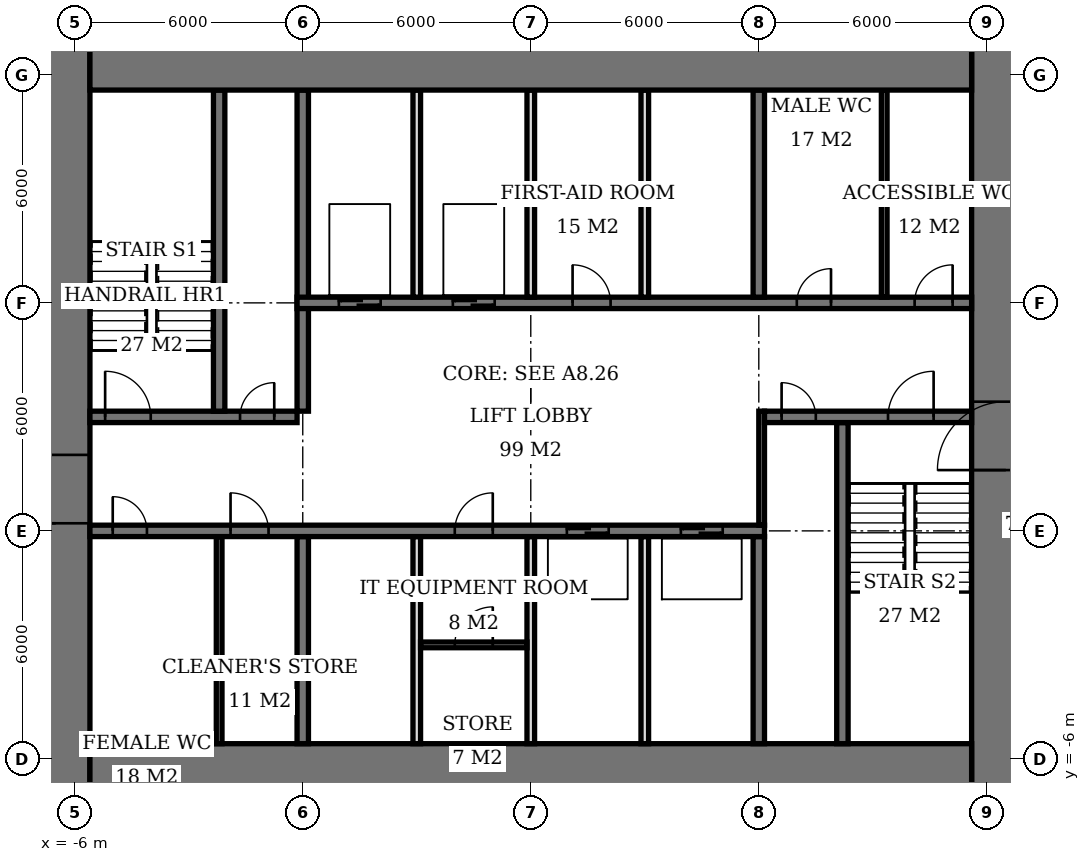
"""IFC4 building model, lengths in metres.
Left out: names, types, materials, properties, quantities, classifications, styles, units other than length and angle.
Written with IfcOpenShell. Run it as: python <this file> out.ifc"""

import sys

from ifc_helpers import new_model, si_unit, direction, frame, frame_2d, origin, place, context, subcontext, project, spatial, rectangle, extrude, element, fill, save


model = new_model("IFC4")
c1 = context("Model", 3, precision=1e-05, world=origin(), true_north=direction((0.0, 1.0)))
c2 = subcontext(c1, "Body", "Model", "MODEL_VIEW")
j1 = project(units=[si_unit("LENGTHUNIT", "METRE"), si_unit("PLANEANGLEUNIT", "RADIAN")], contexts=[c1])
p1 = place(None, origin())
s1 = spatial("IfcSite", under=j1, at=p1, CompositionType="ELEMENT")
p2 = place(p1, origin())
s2 = spatial("IfcBuilding", under=s1, at=p2, CompositionType="ELEMENT")
p3 = place(p2, frame((0.0, 0.0, 196.7)))
s3 = spatial("IfcBuildingStorey", under=s2, at=p3, CompositionType="ELEMENT", Elevation=196.7)
for number, where, z_axis, x_axis in (
    (1, (-5.6, -6.6, 0.0), (0.0, 0.0, 1.0), (1.0, 0.0, 0.0)),
    (2, (-5.6, 12.6, 0.0), (0.0, 0.0, 1.0), (1.0, 0.0, 0.0)),
):
    element("IfcWall", number, at=place(p3, frame(where, z_axis=z_axis, x_axis=x_axis)), inside=s3, PredefinedType="SHEAR", context=c2, shape_type="SweptSolid", body=[
        extrude(rectangle(XDim=23.2, YDim=2.0, at=frame_2d((11.6, 0.0))), origin(), (0.0, 0.0, 1.0), 3.9),
    ])
p4 = place(p3, frame((-6.5, -7.6, 0.0), z_axis=(0.0, 0.0, 1.0), x_axis=(0.0, 1.0, 0.0)))
e3 = element("IfcWall", 3, at=p4, inside=s3, PredefinedType="SHEAR", context=c2, shape_type="SweptSolid", body=[
    extrude(rectangle(XDim=21.2, YDim=1.8, at=frame_2d((10.6, 0.0))), origin(), (0.0, 0.0, 1.0), 3.9),
])
p5 = place(p4, frame((7.8, 0.0, 0.0)))
e4 = element("IfcOpeningElement", 4, at=p5, cuts=e3, PredefinedType="OPENING", context=c2, shape_type="SweptSolid", body=[
    extrude(rectangle(XDim=1.8, YDim=2.4, at=frame_2d((0.9, 1.2))), frame((0.0, 0.91, 0.0), z_axis=(0.0, -1.0, 0.0), x_axis=(1.0, 0.0, 0.0)), (0.0, 0.0, 1.0), 1.82),
])
p6 = place(p3, frame((18.5, -7.6, 0.0), z_axis=(0.0, 0.0, 1.0), x_axis=(0.0, 1.0, 0.0)))
e5 = element("IfcWall", 5, at=p6, inside=s3, PredefinedType="SHEAR", context=c2, shape_type="SweptSolid", body=[
    extrude(rectangle(XDim=21.2, YDim=1.8, at=frame_2d((10.6, 0.0))), origin(), (0.0, 0.0, 1.0), 3.9),
])
p7 = place(p6, frame((9.2, 0.0, 0.0)))
e6 = element("IfcOpeningElement", 6, at=p7, cuts=e5, PredefinedType="OPENING", context=c2, shape_type="SweptSolid", body=[
    extrude(rectangle(XDim=1.8, YDim=2.4, at=frame_2d((0.9, 1.2))), frame((0.0, 0.91, 0.0), z_axis=(0.0, -1.0, 0.0), x_axis=(1.0, 0.0, 0.0)), (0.0, 0.0, 1.0), 1.82),
])
p8 = place(p3, frame((-5.6, 0.0, 0.0), z_axis=(0.0, 0.0, 1.0), x_axis=(1.0, 0.0, 0.0)))
e7 = element("IfcWall", 7, at=p8, inside=s3, PredefinedType="SHEAR", context=c2, shape_type="SweptSolid", body=[
    extrude(rectangle(XDim=17.75, YDim=0.3, at=frame_2d((8.875, 0.0))), origin(), (0.0, 0.0, 1.0), 3.9),
])
p9 = place(p8, frame((0.6, 0.0, 0.0)))
e8 = element("IfcOpeningElement", 8, at=p9, cuts=e7, PredefinedType="OPENING", context=c2, shape_type="SweptSolid", body=[
    extrude(rectangle(XDim=0.9, YDim=2.1, at=frame_2d((0.45, 1.05))), frame((0.0, 0.16, 0.0), z_axis=(0.0, -1.0, 0.0), x_axis=(1.0, 0.0, 0.0)), (0.0, 0.0, 1.0), 0.32),
])
p10 = place(p8, frame((3.7, 0.0, 0.0)))
e9 = element("IfcOpeningElement", 9, at=p10, cuts=e7, PredefinedType="OPENING", context=c2, shape_type="SweptSolid", body=[
    extrude(rectangle(XDim=1.0, YDim=2.1, at=frame_2d((0.5, 1.05))), frame((0.0, 0.16, 0.0), z_axis=(0.0, -1.0, 0.0), x_axis=(1.0, 0.0, 0.0)), (0.0, 0.0, 1.0), 0.32),
])
p11 = place(p8, frame((9.6, 0.0, 0.0)))
e10 = element("IfcOpeningElement", 10, at=p11, cuts=e7, PredefinedType="OPENING", context=c2, shape_type="SweptSolid", body=[
    extrude(rectangle(XDim=1.0, YDim=2.1, at=frame_2d((0.5, 1.05))), frame((0.0, 0.16, 0.0), z_axis=(0.0, -1.0, 0.0), x_axis=(1.0, 0.0, 0.0)), (0.0, 0.0, 1.0), 0.32),
])
p12 = place(p8, frame((12.55, 0.0, 0.0)))
e11 = element("IfcOpeningElement", 11, at=p12, cuts=e7, PredefinedType="OPENING", context=c2, shape_type="SweptSolid", body=[
    extrude(rectangle(XDim=1.1, YDim=2.1, at=frame_2d((0.55, 1.05))), frame((0.0, 0.16, 0.0), z_axis=(0.0, -1.0, 0.0), x_axis=(1.0, 0.0, 0.0)), (0.0, 0.0, 1.0), 0.32),
])
p13 = place(p8, frame((15.55, 0.0, 0.0)))
e12 = element("IfcOpeningElement", 12, at=p13, cuts=e7, PredefinedType="OPENING", context=c2, shape_type="SweptSolid", body=[
    extrude(rectangle(XDim=1.1, YDim=2.1, at=frame_2d((0.55, 1.05))), frame((0.0, 0.16, 0.0), z_axis=(0.0, -1.0, 0.0), x_axis=(1.0, 0.0, 0.0)), (0.0, 0.0, 1.0), 0.32),
])
p14 = place(p3, frame((-5.6, 3.0, 0.0), z_axis=(0.0, 0.0, 1.0), x_axis=(1.0, 0.0, 0.0)))
e13 = element("IfcWall", 13, at=p14, inside=s3, PredefinedType="SHEAR", context=c2, shape_type="SweptSolid", body=[
    extrude(rectangle(XDim=5.45, YDim=0.3, at=frame_2d((2.725, 0.0))), origin(), (0.0, 0.0, 1.0), 3.9),
])
p15 = place(p14, frame((0.4, 0.0, 0.0)))
e14 = element("IfcOpeningElement", 14, at=p15, cuts=e13, PredefinedType="OPENING", context=c2, shape_type="SweptSolid", body=[
    extrude(rectangle(XDim=1.2, YDim=2.1, at=frame_2d((0.6, 1.05))), frame((0.0, 0.16, 0.0), z_axis=(0.0, -1.0, 0.0), x_axis=(1.0, 0.0, 0.0)), (0.0, 0.0, 1.0), 0.32),
])
p16 = place(p14, frame((3.95, 0.0, 0.0)))
e15 = element("IfcOpeningElement", 15, at=p16, cuts=e13, PredefinedType="OPENING", context=c2, shape_type="SweptSolid", body=[
    extrude(rectangle(XDim=0.9, YDim=2.1, at=frame_2d((0.45, 1.05))), frame((0.0, 0.16, 0.0), z_axis=(0.0, -1.0, 0.0), x_axis=(1.0, 0.0, 0.0)), (0.0, 0.0, 1.0), 0.32),
])
p17 = place(p3, frame((12.15, 3.0, 0.0), z_axis=(0.0, 0.0, 1.0), x_axis=(1.0, 0.0, 0.0)))
e16 = element("IfcWall", 16, at=p17, inside=s3, PredefinedType="SHEAR", context=c2, shape_type="SweptSolid", body=[
    extrude(rectangle(XDim=5.45, YDim=0.3, at=frame_2d((2.725, 0.0))), origin(), (0.0, 0.0, 1.0), 3.9),
])
p18 = place(p17, frame((3.25, 0.0, 0.0)))
e17 = element("IfcOpeningElement", 17, at=p18, cuts=e16, PredefinedType="OPENING", context=c2, shape_type="SweptSolid", body=[
    extrude(rectangle(XDim=1.2, YDim=2.1, at=frame_2d((0.6, 1.05))), frame((0.0, 0.16, 0.0), z_axis=(0.0, -1.0, 0.0), x_axis=(1.0, 0.0, 0.0)), (0.0, 0.0, 1.0), 0.32),
])
p19 = place(p17, frame((0.45, 0.0, 0.0)))
e18 = element("IfcOpeningElement", 18, at=p19, cuts=e16, PredefinedType="OPENING", context=c2, shape_type="SweptSolid", body=[
    extrude(rectangle(XDim=0.9, YDim=2.1, at=frame_2d((0.45, 1.05))), frame((0.0, 0.16, 0.0), z_axis=(0.0, -1.0, 0.0), x_axis=(1.0, 0.0, 0.0)), (0.0, 0.0, 1.0), 0.32),
])
p20 = place(p3, frame((-0.15, 6.0, 0.0), z_axis=(0.0, 0.0, 1.0), x_axis=(1.0, 0.0, 0.0)))
e19 = element("IfcWall", 19, at=p20, inside=s3, PredefinedType="SHEAR", context=c2, shape_type="SweptSolid", body=[
    extrude(rectangle(XDim=17.75, YDim=0.3, at=frame_2d((8.875, 0.0))), origin(), (0.0, 0.0, 1.0), 3.9),
])
p21 = place(p20, frame((13.15, 0.0, 0.0)))
e20 = element("IfcOpeningElement", 20, at=p21, cuts=e19, PredefinedType="OPENING", context=c2, shape_type="SweptSolid", body=[
    extrude(rectangle(XDim=0.9, YDim=2.1, at=frame_2d((0.45, 1.05))), frame((0.0, 0.16, 0.0), z_axis=(0.0, -1.0, 0.0), x_axis=(1.0, 0.0, 0.0)), (0.0, 0.0, 1.0), 0.32),
])
p22 = place(p20, frame((16.25, 0.0, 0.0)))
e21 = element("IfcOpeningElement", 21, at=p22, cuts=e19, PredefinedType="OPENING", context=c2, shape_type="SweptSolid", body=[
    extrude(rectangle(XDim=1.0, YDim=2.1, at=frame_2d((0.5, 1.05))), frame((0.0, 0.16, 0.0), z_axis=(0.0, -1.0, 0.0), x_axis=(1.0, 0.0, 0.0)), (0.0, 0.0, 1.0), 0.32),
])
p23 = place(p20, frame((7.25, 0.0, 0.0)))
e22 = element("IfcOpeningElement", 22, at=p23, cuts=e19, PredefinedType="OPENING", context=c2, shape_type="SweptSolid", body=[
    extrude(rectangle(XDim=1.0, YDim=2.1, at=frame_2d((0.5, 1.05))), frame((0.0, 0.16, 0.0), z_axis=(0.0, -1.0, 0.0), x_axis=(1.0, 0.0, 0.0)), (0.0, 0.0, 1.0), 0.32),
])
p24 = place(p20, frame((1.1, 0.0, 0.0)))
e23 = element("IfcOpeningElement", 23, at=p24, cuts=e19, PredefinedType="OPENING", context=c2, shape_type="SweptSolid", body=[
    extrude(rectangle(XDim=1.1, YDim=2.1, at=frame_2d((0.55, 1.05))), frame((0.0, 0.16, 0.0), z_axis=(0.0, -1.0, 0.0), x_axis=(1.0, 0.0, 0.0)), (0.0, 0.0, 1.0), 0.32),
])
p25 = place(p20, frame((4.1, 0.0, 0.0)))
e24 = element("IfcOpeningElement", 24, at=p25, cuts=e19, PredefinedType="OPENING", context=c2, shape_type="SweptSolid", body=[
    extrude(rectangle(XDim=1.1, YDim=2.1, at=frame_2d((0.55, 1.05))), frame((0.0, 0.16, 0.0), z_axis=(0.0, -1.0, 0.0), x_axis=(1.0, 0.0, 0.0)), (0.0, 0.0, 1.0), 0.32),
])
p26 = place(p3, frame((0.0, -5.6, 0.0), z_axis=(0.0, 0.0, 1.0), x_axis=(0.0, 1.0, 0.0)))
e25 = element("IfcWall", 25, at=p26, inside=s3, PredefinedType="SHEAR", context=c2, shape_type="SweptSolid", body=[
    extrude(rectangle(XDim=5.45, YDim=0.3, at=frame_2d((2.725, 0.0))), origin(), (0.0, 0.0, 1.0), 3.9),
])
p27 = place(p3, frame((0.0, 3.15, 0.0), z_axis=(0.0, 0.0, 1.0), x_axis=(0.0, 1.0, 0.0)))
e26 = element("IfcWall", 26, at=p27, inside=s3, PredefinedType="SHEAR", context=c2, shape_type="SweptSolid", body=[
    extrude(rectangle(XDim=8.45, YDim=0.3, at=frame_2d((4.225, 0.0))), origin(), (0.0, 0.0, 1.0), 3.9),
])
for number, where, z_axis, x_axis in (
    (27, (12.0, -5.6, 0.0), (0.0, 0.0, 1.0), (0.0, 1.0, 0.0)),
    (28, (12.0, 6.15, 0.0), (0.0, 0.0, 1.0), (0.0, 1.0, 0.0)),
):
    element("IfcWall", number, at=place(p3, frame(where, z_axis=z_axis, x_axis=x_axis)), inside=s3, PredefinedType="SHEAR", context=c2, shape_type="SweptSolid", body=[
        extrude(rectangle(XDim=5.45, YDim=0.3, at=frame_2d((2.725, 0.0))), origin(), (0.0, 0.0, 1.0), 3.9),
    ])
for number, where, z_axis, x_axis in (
    (29, (-2.2, 3.15, 0.0), (0.0, 0.0, 1.0), (0.0, 1.0, 0.0)),
    (30, (14.2, -5.6, 0.0), (0.0, 0.0, 1.0), (0.0, 1.0, 0.0)),
):
    element("IfcWall", number, at=place(p3, frame(where, z_axis=z_axis, x_axis=x_axis)), inside=s3, PredefinedType="SHEAR", context=c2, shape_type="SweptSolid", body=[
        extrude(rectangle(XDim=8.45, YDim=0.3, at=frame_2d((4.225, 0.0))), origin(), (0.0, 0.0, 1.0), 3.9),
    ])
for number, where, z_axis, x_axis in (
    (31, (3.0, 6.15, 0.0), (0.0, 0.0, 1.0), (0.0, 1.0, 0.0)),
    (32, (6.0, 6.15, 0.0), (0.0, 0.0, 1.0), (0.0, 1.0, 0.0)),
    (33, (9.0, 6.15, 0.0), (0.0, 0.0, 1.0), (0.0, 1.0, 0.0)),
    (34, (3.0, -5.6, 0.0), (0.0, 0.0, 1.0), (0.0, 1.0, 0.0)),
    (35, (6.0, -5.6, 0.0), (0.0, 0.0, 1.0), (0.0, 1.0, 0.0)),
    (36, (9.0, -5.6, 0.0), (0.0, 0.0, 1.0), (0.0, 1.0, 0.0)),
):
    element("IfcWall", number, at=place(p3, frame(where, z_axis=z_axis, x_axis=x_axis)), inside=s3, PredefinedType="SOLIDWALL", context=c2, shape_type="SweptSolid", body=[
        extrude(rectangle(XDim=5.45, YDim=0.2, at=frame_2d((2.725, 0.0))), origin(), (0.0, 0.0, 1.0), 3.9),
    ])
for number, where, z_axis, x_axis in (
    (37, (-2.2, -5.6, 0.0), (0.0, 0.0, 1.0), (0.0, 1.0, 0.0)),
    (38, (15.3, 6.15, 0.0), (0.0, 0.0, 1.0), (0.0, 1.0, 0.0)),
):
    element("IfcWall", number, at=place(p3, frame(where, z_axis=z_axis, x_axis=x_axis)), inside=s3, PredefinedType="PLUMBINGWALL", context=c2, shape_type="SweptSolid", body=[
        extrude(rectangle(XDim=5.45, YDim=0.15, at=frame_2d((2.725, 0.0))), origin(), (0.0, 0.0, 1.0), 3.65),
    ])
p28 = place(p3, frame((3.1, -3.0, 0.0), z_axis=(0.0, 0.0, 1.0), x_axis=(1.0, 0.0, 0.0)))
e39 = element("IfcWall", 39, at=p28, inside=s3, PredefinedType="PARTITIONING", context=c2, shape_type="SweptSolid", body=[
    extrude(rectangle(XDim=2.8, YDim=0.15, at=frame_2d((1.4, 0.0))), origin(), (0.0, 0.0, 1.0), 3.65),
])
p29 = place(p28, frame((0.9, 0.0, 0.0)))
e40 = element("IfcOpeningElement", 40, at=p29, cuts=e39, PredefinedType="OPENING", context=c2, shape_type="SweptSolid", body=[
    extrude(rectangle(XDim=1.0, YDim=2.1, at=frame_2d((0.5, 1.05))), frame((0.0, 0.085, 0.0), z_axis=(0.0, -1.0, 0.0), x_axis=(1.0, 0.0, 0.0)), (0.0, 0.0, 1.0), 0.17),
])
p30 = place(p3, frame((12.075, 0.15, 0.0), z_axis=(0.0, 0.0, 1.0), x_axis=(0.0, 1.0, 0.0)))
e41 = element("IfcWall", 41, at=p30, inside=s3, PredefinedType="PARTITIONING", context=c2, shape_type="SweptSolid", body=[
    extrude(rectangle(XDim=3.0, YDim=0.15, at=frame_2d((1.5, 0.0))), origin(), (0.0, 0.0, 1.0), 3.65),
])
p31 = place(p5, origin())
e42 = element("IfcDoor", 42, at=p31, inside=s3, OperationType="DOUBLE_DOOR_SINGLE_SWING", PredefinedType="DOOR", context=c2, shape_type="SweptSolid", body=[
    extrude(rectangle(XDim=1.8, YDim=2.4, at=frame_2d((0.9, 1.2))), frame((0.0, 0.025, 0.0), z_axis=(0.0, -1.0, 0.0), x_axis=(1.0, 0.0, 0.0)), (0.0, 0.0, 1.0), 0.05),
])
fill(e4, e42)
p32 = place(p7, origin())
e43 = element("IfcDoor", 43, at=p32, inside=s3, OperationType="DOUBLE_DOOR_SINGLE_SWING", PredefinedType="DOOR", context=c2, shape_type="SweptSolid", body=[
    extrude(rectangle(XDim=1.8, YDim=2.4, at=frame_2d((0.9, 1.2))), frame((0.0, 0.025, 0.0), z_axis=(0.0, -1.0, 0.0), x_axis=(1.0, 0.0, 0.0)), (0.0, 0.0, 1.0), 0.05),
])
fill(e6, e43)
p33 = place(p15, origin())
e44 = element("IfcDoor", 44, at=p33, inside=s3, OperationType="SINGLE_SWING_LEFT", PredefinedType="DOOR", context=c2, shape_type="SweptSolid", body=[
    extrude(rectangle(XDim=1.2, YDim=2.1, at=frame_2d((0.6, 1.05))), frame((0.0, 0.025, 0.0), z_axis=(0.0, -1.0, 0.0), x_axis=(1.0, 0.0, 0.0)), (0.0, 0.0, 1.0), 0.05),
])
fill(e14, e44)
p34 = place(p16, origin())
e45 = element("IfcDoor", 45, at=p34, inside=s3, OperationType="SINGLE_SWING_RIGHT", PredefinedType="DOOR", context=c2, shape_type="SweptSolid", body=[
    extrude(rectangle(XDim=0.9, YDim=2.1, at=frame_2d((0.45, 1.05))), frame((0.0, 0.025, 0.0), z_axis=(0.0, -1.0, 0.0), x_axis=(1.0, 0.0, 0.0)), (0.0, 0.0, 1.0), 0.05),
])
fill(e15, e45)
p35 = place(p18, origin())
e46 = element("IfcDoor", 46, at=p35, inside=s3, OperationType="SINGLE_SWING_RIGHT", PredefinedType="DOOR", context=c2, shape_type="SweptSolid", body=[
    extrude(rectangle(XDim=1.2, YDim=2.1, at=frame_2d((0.6, 1.05))), frame((0.0, 0.025, 0.0), z_axis=(0.0, -1.0, 0.0), x_axis=(1.0, 0.0, 0.0)), (0.0, 0.0, 1.0), 0.05),
])
fill(e17, e46)
p36 = place(p19, origin())
e47 = element("IfcDoor", 47, at=p36, inside=s3, OperationType="SINGLE_SWING_LEFT", PredefinedType="DOOR", context=c2, shape_type="SweptSolid", body=[
    extrude(rectangle(XDim=0.9, YDim=2.1, at=frame_2d((0.45, 1.05))), frame((0.0, 0.025, 0.0), z_axis=(0.0, -1.0, 0.0), x_axis=(1.0, 0.0, 0.0)), (0.0, 0.0, 1.0), 0.05),
])
fill(e18, e47)
p37 = place(p9, origin())
e48 = element("IfcDoor", 48, at=p37, inside=s3, OperationType="SINGLE_SWING_LEFT", PredefinedType="DOOR", context=c2, shape_type="SweptSolid", body=[
    extrude(rectangle(XDim=0.9, YDim=2.1, at=frame_2d((0.45, 1.05))), frame((0.0, 0.025, 0.0), z_axis=(0.0, -1.0, 0.0), x_axis=(1.0, 0.0, 0.0)), (0.0, 0.0, 1.0), 0.05),
])
fill(e8, e48)
p38 = place(p10, origin())
e49 = element("IfcDoor", 49, at=p38, inside=s3, OperationType="SINGLE_SWING_LEFT", PredefinedType="DOOR", context=c2, shape_type="SweptSolid", body=[
    extrude(rectangle(XDim=1.0, YDim=2.1, at=frame_2d((0.5, 1.05))), frame((0.0, 0.025, 0.0), z_axis=(0.0, -1.0, 0.0), x_axis=(1.0, 0.0, 0.0)), (0.0, 0.0, 1.0), 0.05),
])
fill(e9, e49)
p39 = place(p21, origin())
e50 = element("IfcDoor", 50, at=p39, inside=s3, OperationType="SINGLE_SWING_RIGHT", PredefinedType="DOOR", context=c2, shape_type="SweptSolid", body=[
    extrude(rectangle(XDim=0.9, YDim=2.1, at=frame_2d((0.45, 1.05))), frame((0.0, 0.025, 0.0), z_axis=(0.0, -1.0, 0.0), x_axis=(1.0, 0.0, 0.0)), (0.0, 0.0, 1.0), 0.05),
])
fill(e20, e50)
p40 = place(p22, origin())
e51 = element("IfcDoor", 51, at=p40, inside=s3, OperationType="SINGLE_SWING_RIGHT", PredefinedType="DOOR", context=c2, shape_type="SweptSolid", body=[
    extrude(rectangle(XDim=1.0, YDim=2.1, at=frame_2d((0.5, 1.05))), frame((0.0, 0.025, 0.0), z_axis=(0.0, -1.0, 0.0), x_axis=(1.0, 0.0, 0.0)), (0.0, 0.0, 1.0), 0.05),
])
fill(e21, e51)
p41 = place(p23, origin())
e52 = element("IfcDoor", 52, at=p41, inside=s3, OperationType="SINGLE_SWING_LEFT", PredefinedType="DOOR", context=c2, shape_type="SweptSolid", body=[
    extrude(rectangle(XDim=1.0, YDim=2.1, at=frame_2d((0.5, 1.05))), frame((0.0, 0.025, 0.0), z_axis=(0.0, -1.0, 0.0), x_axis=(1.0, 0.0, 0.0)), (0.0, 0.0, 1.0), 0.05),
])
fill(e22, e52)
p42 = place(p29, origin())
e53 = element("IfcDoor", 53, at=p42, inside=s3, OperationType="SINGLE_SWING_RIGHT", PredefinedType="DOOR", context=c2, shape_type="SweptSolid", body=[
    extrude(rectangle(XDim=1.0, YDim=2.1, at=frame_2d((0.5, 1.05))), frame((0.0, 0.025, 0.0), z_axis=(0.0, -1.0, 0.0), x_axis=(1.0, 0.0, 0.0)), (0.0, 0.0, 1.0), 0.05),
])
fill(e40, e53)
p43 = place(p11, origin())
e54 = element("IfcDoor", 54, at=p43, inside=s3, OperationType="SINGLE_SWING_RIGHT", PredefinedType="DOOR", context=c2, shape_type="SweptSolid", body=[
    extrude(rectangle(XDim=1.0, YDim=2.1, at=frame_2d((0.5, 1.05))), frame((0.0, 0.025, 0.0), z_axis=(0.0, -1.0, 0.0), x_axis=(1.0, 0.0, 0.0)), (0.0, 0.0, 1.0), 0.05),
])
fill(e10, e54)
p44 = place(p24, origin())
e55 = element("IfcDoor", 55, at=p44, inside=s3, OperationType="DOUBLE_DOOR_SLIDING", PredefinedType="USERDEFINED", context=c2, shape_type="SweptSolid", body=[
    extrude(rectangle(XDim=1.1, YDim=2.1, at=frame_2d((0.55, 1.05))), frame((0.0, 0.025, 0.0), z_axis=(0.0, -1.0, 0.0), x_axis=(1.0, 0.0, 0.0)), (0.0, 0.0, 1.0), 0.05),
])
fill(e23, e55)
p45 = place(p25, origin())
e56 = element("IfcDoor", 56, at=p45, inside=s3, OperationType="DOUBLE_DOOR_SLIDING", PredefinedType="USERDEFINED", context=c2, shape_type="SweptSolid", body=[
    extrude(rectangle(XDim=1.1, YDim=2.1, at=frame_2d((0.55, 1.05))), frame((0.0, 0.025, 0.0), z_axis=(0.0, -1.0, 0.0), x_axis=(1.0, 0.0, 0.0)), (0.0, 0.0, 1.0), 0.05),
])
fill(e24, e56)
p46 = place(p12, origin())
e57 = element("IfcDoor", 57, at=p46, inside=s3, OperationType="DOUBLE_DOOR_SLIDING", PredefinedType="USERDEFINED", context=c2, shape_type="SweptSolid", body=[
    extrude(rectangle(XDim=1.1, YDim=2.1, at=frame_2d((0.55, 1.05))), frame((0.0, 0.025, 0.0), z_axis=(0.0, -1.0, 0.0), x_axis=(1.0, 0.0, 0.0)), (0.0, 0.0, 1.0), 0.05),
])
fill(e11, e57)
p47 = place(p13, origin())
e58 = element("IfcDoor", 58, at=p47, inside=s3, OperationType="DOUBLE_DOOR_SLIDING", PredefinedType="USERDEFINED", context=c2, shape_type="SweptSolid", body=[
    extrude(rectangle(XDim=1.1, YDim=2.1, at=frame_2d((0.55, 1.05))), frame((0.0, 0.025, 0.0), z_axis=(0.0, -1.0, 0.0), x_axis=(1.0, 0.0, 0.0)), (0.0, 0.0, 1.0), 0.05),
])
fill(e12, e58)
save(model, sys.argv[1])
